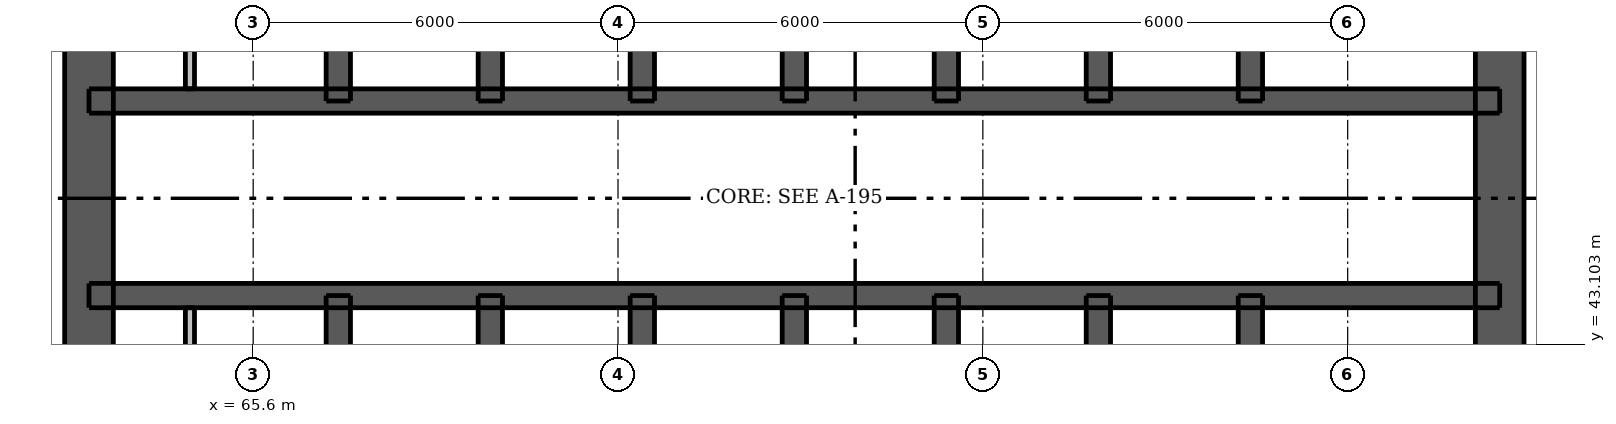
"""IFC4 building model, lengths in metres.
Left out: names, types, materials, properties, quantities, classifications, styles, units other than length and angle.
Written with IfcOpenShell. Run it as: python <this file> out.ifc"""

import sys

from ifc_helpers import new_model, si_unit, direction, frame, frame_2d, origin, place, context, subcontext, project, spatial, rectangle, extrude, element, fill, save


model = new_model("IFC4")
c1 = context("Model", 3, precision=1e-05, world=origin(), true_north=direction((0.0, 1.0)))
c2 = subcontext(c1, "Body", "Model", "MODEL_VIEW")
j1 = project(units=[si_unit("LENGTHUNIT", "METRE"), si_unit("PLANEANGLEUNIT", "RADIAN")], contexts=[c1])
p1 = place(None, origin())
s1 = spatial("IfcSite", under=j1, at=p1, CompositionType="ELEMENT")
p2 = place(p1, origin())
s2 = spatial("IfcBuilding", under=s1, at=p2, CompositionType="ELEMENT")
p3 = place(p2, frame((0.0, 0.0, 111.7)))
s3 = spatial("IfcBuildingStorey", under=s2, at=p3, CompositionType="ELEMENT", Elevation=111.7)
p4 = place(p3, frame((62.9, 33.5, 0.0), z_axis=(0.0, 0.0, 1.0), x_axis=(0.0, 1.0, 0.0)))
e1 = element("IfcWall", 1, at=p4, inside=s3, PredefinedType="SHEAR", context=c2, shape_type="SweptSolid", body=[
    extrude(rectangle(XDim=24.0, YDim=0.8, at=frame_2d((12.0, 0.0))), origin(), (0.0, 0.0, 1.0), 3.05),
])
p5 = place(p4, frame((11.2, 0.0, 0.0)))
e2 = element("IfcOpeningElement", 2, at=p5, cuts=e1, PredefinedType="OPENING", context=c2, shape_type="SweptSolid", body=[
    extrude(rectangle(XDim=1.6, YDim=2.1, at=frame_2d((0.8, 1.05))), frame((0.0, 0.41, 0.0), z_axis=(0.0, -1.0, 0.0), x_axis=(1.0, 0.0, 0.0)), (0.0, 0.0, 1.0), 0.82),
])
p6 = place(p3, frame((86.1, 33.5, 0.0), z_axis=(0.0, 0.0, 1.0), x_axis=(0.0, 1.0, 0.0)))
e3 = element("IfcWall", 3, at=p6, inside=s3, PredefinedType="SHEAR", context=c2, shape_type="SweptSolid", body=[
    extrude(rectangle(XDim=24.0, YDim=0.8, at=frame_2d((12.0, 0.0))), origin(), (0.0, 0.0, 1.0), 3.05),
])
p7 = place(p6, frame((11.2, 0.0, 0.0)))
e4 = element("IfcOpeningElement", 4, at=p7, cuts=e3, PredefinedType="OPENING", context=c2, shape_type="SweptSolid", body=[
    extrude(rectangle(XDim=1.6, YDim=2.1, at=frame_2d((0.8, 1.05))), frame((0.0, 0.41, 0.0), z_axis=(0.0, -1.0, 0.0), x_axis=(1.0, 0.0, 0.0)), (0.0, 0.0, 1.0), 0.82),
])
p8 = place(p3, frame((62.9, 43.9, 0.0), z_axis=(0.0, 0.0, 1.0), x_axis=(1.0, 0.0, 0.0)))
e5 = element("IfcWall", 5, at=p8, inside=s3, PredefinedType="SHEAR", context=c2, shape_type="SweptSolid", body=[
    extrude(rectangle(XDim=23.2, YDim=0.4, at=frame_2d((11.6, 0.0))), origin(), (0.0, 0.0, 1.0), 3.05),
])
p9 = place(p8, frame((0.63, 0.0, 0.0)))
e6 = element("IfcOpeningElement", 6, at=p9, cuts=e5, PredefinedType="OPENING", context=c2, shape_type="SweptSolid", body=[
    extrude(rectangle(XDim=0.8, YDim=2.1, at=frame_2d((0.4, 1.05))), frame((0.0, 0.21, 0.0), z_axis=(0.0, -1.0, 0.0), x_axis=(1.0, 0.0, 0.0)), (0.0, 0.0, 1.0), 0.42),
])
p10 = place(p8, frame((2.33, 0.0, 0.0)))
e7 = element("IfcOpeningElement", 7, at=p10, cuts=e5, PredefinedType="OPENING", context=c2, shape_type="SweptSolid", body=[
    extrude(rectangle(XDim=0.9, YDim=2.1, at=frame_2d((0.45, 1.05))), frame((0.0, 0.21, 0.0), z_axis=(0.0, -1.0, 0.0), x_axis=(1.0, 0.0, 0.0)), (0.0, 0.0, 1.0), 0.42),
])
p11 = place(p8, frame((20.6, 0.0, 0.0)))
e8 = element("IfcOpeningElement", 8, at=p11, cuts=e5, PredefinedType="OPENING", context=c2, shape_type="SweptSolid", body=[
    extrude(rectangle(XDim=0.9, YDim=2.1, at=frame_2d((0.45, 1.05))), frame((0.0, 0.21, 0.0), z_axis=(0.0, -1.0, 0.0), x_axis=(1.0, 0.0, 0.0)), (0.0, 0.0, 1.0), 0.42),
])
p12 = place(p8, frame((4.8, 0.0, 0.0)))
e9 = element("IfcOpeningElement", 9, at=p12, cuts=e5, PredefinedType="OPENING", context=c2, shape_type="SweptSolid", body=[
    extrude(rectangle(XDim=1.1, YDim=2.1, at=frame_2d((0.55, 1.05))), frame((0.0, 0.21, 0.0), z_axis=(0.0, -1.0, 0.0), x_axis=(1.0, 0.0, 0.0)), (0.0, 0.0, 1.0), 0.42),
])
p13 = place(p8, frame((7.3, 0.0, 0.0)))
e10 = element("IfcOpeningElement", 10, at=p13, cuts=e5, PredefinedType="OPENING", context=c2, shape_type="SweptSolid", body=[
    extrude(rectangle(XDim=1.1, YDim=2.1, at=frame_2d((0.55, 1.05))), frame((0.0, 0.21, 0.0), z_axis=(0.0, -1.0, 0.0), x_axis=(1.0, 0.0, 0.0)), (0.0, 0.0, 1.0), 0.42),
])
p14 = place(p8, frame((9.8, 0.0, 0.0)))
e11 = element("IfcOpeningElement", 11, at=p14, cuts=e5, PredefinedType="OPENING", context=c2, shape_type="SweptSolid", body=[
    extrude(rectangle(XDim=1.1, YDim=2.1, at=frame_2d((0.55, 1.05))), frame((0.0, 0.21, 0.0), z_axis=(0.0, -1.0, 0.0), x_axis=(1.0, 0.0, 0.0)), (0.0, 0.0, 1.0), 0.42),
])
p15 = place(p8, frame((12.3, 0.0, 0.0)))
e12 = element("IfcOpeningElement", 12, at=p15, cuts=e5, PredefinedType="OPENING", context=c2, shape_type="SweptSolid", body=[
    extrude(rectangle(XDim=1.1, YDim=2.1, at=frame_2d((0.55, 1.05))), frame((0.0, 0.21, 0.0), z_axis=(0.0, -1.0, 0.0), x_axis=(1.0, 0.0, 0.0)), (0.0, 0.0, 1.0), 0.42),
])
p16 = place(p8, frame((14.8, 0.0, 0.0)))
e13 = element("IfcOpeningElement", 13, at=p16, cuts=e5, PredefinedType="OPENING", context=c2, shape_type="SweptSolid", body=[
    extrude(rectangle(XDim=1.1, YDim=2.1, at=frame_2d((0.55, 1.05))), frame((0.0, 0.21, 0.0), z_axis=(0.0, -1.0, 0.0), x_axis=(1.0, 0.0, 0.0)), (0.0, 0.0, 1.0), 0.42),
])
p17 = place(p8, frame((17.3, 0.0, 0.0)))
e14 = element("IfcOpeningElement", 14, at=p17, cuts=e5, PredefinedType="OPENING", context=c2, shape_type="SweptSolid", body=[
    extrude(rectangle(XDim=1.1, YDim=2.1, at=frame_2d((0.55, 1.05))), frame((0.0, 0.21, 0.0), z_axis=(0.0, -1.0, 0.0), x_axis=(1.0, 0.0, 0.0)), (0.0, 0.0, 1.0), 0.42),
])
p18 = place(p3, frame((62.9, 47.1, 0.0), z_axis=(0.0, 0.0, 1.0), x_axis=(1.0, 0.0, 0.0)))
e15 = element("IfcWall", 15, at=p18, inside=s3, PredefinedType="SHEAR", context=c2, shape_type="SweptSolid", body=[
    extrude(rectangle(XDim=23.2, YDim=0.4, at=frame_2d((11.6, 0.0))), origin(), (0.0, 0.0, 1.0), 3.05),
])
p19 = place(p18, frame((0.63, 0.0, 0.0)))
e16 = element("IfcOpeningElement", 16, at=p19, cuts=e15, PredefinedType="OPENING", context=c2, shape_type="SweptSolid", body=[
    extrude(rectangle(XDim=0.8, YDim=2.1, at=frame_2d((0.4, 1.05))), frame((0.0, 0.21, 0.0), z_axis=(0.0, -1.0, 0.0), x_axis=(1.0, 0.0, 0.0)), (0.0, 0.0, 1.0), 0.42),
])
p20 = place(p18, frame((2.33, 0.0, 0.0)))
e17 = element("IfcOpeningElement", 17, at=p20, cuts=e15, PredefinedType="OPENING", context=c2, shape_type="SweptSolid", body=[
    extrude(rectangle(XDim=0.9, YDim=2.1, at=frame_2d((0.45, 1.05))), frame((0.0, 0.21, 0.0), z_axis=(0.0, -1.0, 0.0), x_axis=(1.0, 0.0, 0.0)), (0.0, 0.0, 1.0), 0.42),
])
p21 = place(p18, frame((20.6, 0.0, 0.0)))
e18 = element("IfcOpeningElement", 18, at=p21, cuts=e15, PredefinedType="OPENING", context=c2, shape_type="SweptSolid", body=[
    extrude(rectangle(XDim=0.9, YDim=2.1, at=frame_2d((0.45, 1.05))), frame((0.0, 0.21, 0.0), z_axis=(0.0, -1.0, 0.0), x_axis=(1.0, 0.0, 0.0)), (0.0, 0.0, 1.0), 0.42),
])
p22 = place(p3, frame((67.0, 33.9, 0.0), z_axis=(0.0, 0.0, 1.0), x_axis=(0.0, 1.0, 0.0)))
e19 = element("IfcWall", 19, at=p22, inside=s3, PredefinedType="SHEAR", context=c2, shape_type="SweptSolid", body=[
    extrude(rectangle(XDim=10.0, YDim=0.4, at=frame_2d((5.0, 0.0))), origin(), (0.0, 0.0, 1.0), 3.05),
])
p23 = place(p22, frame((0.6, 0.0, 0.0)))
e20 = element("IfcOpeningElement", 20, at=p23, cuts=e19, PredefinedType="OPENING", context=c2, shape_type="SweptSolid", body=[
    extrude(rectangle(XDim=1.1, YDim=2.1, at=frame_2d((0.55, 1.05))), frame((0.0, 0.21, 0.0), z_axis=(0.0, -1.0, 0.0), x_axis=(1.0, 0.0, 0.0)), (0.0, 0.0, 1.0), 0.42),
])
for number, where, z_axis, x_axis in (
    (21, (67.0, 47.1, 0.0), (0.0, 0.0, 1.0), (0.0, 1.0, 0.0)),
    (22, (82.0, 33.9, 0.0), (0.0, 0.0, 1.0), (0.0, 1.0, 0.0)),
    (23, (82.0, 47.1, 0.0), (0.0, 0.0, 1.0), (0.0, 1.0, 0.0)),
):
    element("IfcWall", number, at=place(p3, frame(where, z_axis=z_axis, x_axis=x_axis)), inside=s3, PredefinedType="SHEAR", context=c2, shape_type="SweptSolid", body=[
        extrude(rectangle(XDim=10.0, YDim=0.4, at=frame_2d((5.0, 0.0))), origin(), (0.0, 0.0, 1.0), 3.05),
    ])
for number, where, z_axis, x_axis in (
    (24, (69.5, 41.0, 0.0), (0.0, 0.0, 1.0), (0.0, 1.0, 0.0)),
    (25, (69.5, 47.1, 0.0), (0.0, 0.0, 1.0), (0.0, 1.0, 0.0)),
    (26, (72.0, 41.0, 0.0), (0.0, 0.0, 1.0), (0.0, 1.0, 0.0)),
    (27, (72.0, 47.1, 0.0), (0.0, 0.0, 1.0), (0.0, 1.0, 0.0)),
    (28, (74.5, 41.0, 0.0), (0.0, 0.0, 1.0), (0.0, 1.0, 0.0)),
    (29, (74.5, 47.1, 0.0), (0.0, 0.0, 1.0), (0.0, 1.0, 0.0)),
    (30, (77.0, 41.0, 0.0), (0.0, 0.0, 1.0), (0.0, 1.0, 0.0)),
    (31, (77.0, 47.1, 0.0), (0.0, 0.0, 1.0), (0.0, 1.0, 0.0)),
    (32, (79.5, 41.0, 0.0), (0.0, 0.0, 1.0), (0.0, 1.0, 0.0)),
    (33, (79.5, 47.1, 0.0), (0.0, 0.0, 1.0), (0.0, 1.0, 0.0)),
):
    element("IfcWall", number, at=place(p3, frame(where, z_axis=z_axis, x_axis=x_axis)), inside=s3, PredefinedType="SHEAR", context=c2, shape_type="SweptSolid", body=[
        extrude(rectangle(XDim=2.9, YDim=0.4, at=frame_2d((1.45, 0.0))), origin(), (0.0, 0.0, 1.0), 3.05),
    ])
for number, where, z_axis, x_axis in (
    (34, (64.56, 41.2, 0.0), (0.0, 0.0, 1.0), (0.0, 1.0, 0.0)),
    (35, (64.56, 47.3, 0.0), (0.0, 0.0, 1.0), (0.0, 1.0, 0.0)),
):
    element("IfcWall", number, at=place(p3, frame(where, z_axis=z_axis, x_axis=x_axis)), inside=s3, PredefinedType="PLUMBINGWALL", context=c2, shape_type="SweptSolid", body=[
        extrude(rectangle(XDim=2.5, YDim=0.15, at=frame_2d((1.25, 0.0))), origin(), (0.0, 0.0, 1.0), 3.05),
    ])
p24 = place(p5, origin())
e36 = element("IfcDoor", 36, at=p24, inside=s3, OperationType="DOUBLE_DOOR_SINGLE_SWING", PredefinedType="DOOR", context=c2, shape_type="SweptSolid", body=[
    extrude(rectangle(XDim=1.6, YDim=2.1, at=frame_2d((0.8, 1.05))), frame((0.0, -0.337, 0.0), z_axis=(0.0, -1.0, 0.0), x_axis=(1.0, 0.0, 0.0)), (0.0, 0.0, 1.0), 0.05),
])
fill(e2, e36)
p25 = place(p7, origin())
e37 = element("IfcDoor", 37, at=p25, inside=s3, OperationType="DOUBLE_DOOR_SINGLE_SWING", PredefinedType="DOOR", context=c2, shape_type="SweptSolid", body=[
    extrude(rectangle(XDim=1.6, YDim=2.1, at=frame_2d((0.8, 1.05))), frame((0.0, 0.388, 0.0), z_axis=(0.0, -1.0, 0.0), x_axis=(1.0, 0.0, 0.0)), (0.0, 0.0, 1.0), 0.05),
])
fill(e4, e37)
p26 = place(p9, origin())
e38 = element("IfcDoor", 38, at=p26, inside=s3, OperationType="SINGLE_SWING_LEFT", PredefinedType="DOOR", context=c2, shape_type="SweptSolid", body=[
    extrude(rectangle(XDim=0.8, YDim=2.1, at=frame_2d((0.4, 1.05))), frame((0.0, -0.138, 0.0), z_axis=(0.0, -1.0, 0.0), x_axis=(1.0, 0.0, 0.0)), (0.0, 0.0, 1.0), 0.05),
])
fill(e6, e38)
p27 = place(p10, origin())
e39 = element("IfcDoor", 39, at=p27, inside=s3, OperationType="SINGLE_SWING_RIGHT", PredefinedType="DOOR", context=c2, shape_type="SweptSolid", body=[
    extrude(rectangle(XDim=0.9, YDim=2.1, at=frame_2d((0.45, 1.05))), frame((0.0, -0.138, 0.0), z_axis=(0.0, -1.0, 0.0), x_axis=(1.0, 0.0, 0.0)), (0.0, 0.0, 1.0), 0.05),
])
fill(e7, e39)
p28 = place(p11, origin())
e40 = element("IfcDoor", 40, at=p28, inside=s3, OperationType="SINGLE_SWING_LEFT", PredefinedType="DOOR", context=c2, shape_type="SweptSolid", body=[
    extrude(rectangle(XDim=0.9, YDim=2.1, at=frame_2d((0.45, 1.05))), frame((0.0, -0.138, 0.0), z_axis=(0.0, -1.0, 0.0), x_axis=(1.0, 0.0, 0.0)), (0.0, 0.0, 1.0), 0.05),
])
fill(e8, e40)
p29 = place(p19, origin())
e41 = element("IfcDoor", 41, at=p29, inside=s3, OperationType="SINGLE_SWING_LEFT", PredefinedType="DOOR", context=c2, shape_type="SweptSolid", body=[
    extrude(rectangle(XDim=0.8, YDim=2.1, at=frame_2d((0.4, 1.05))), frame((0.0, 0.188, 0.0), z_axis=(0.0, -1.0, 0.0), x_axis=(1.0, 0.0, 0.0)), (0.0, 0.0, 1.0), 0.05),
])
fill(e16, e41)
p30 = place(p20, origin())
e42 = element("IfcDoor", 42, at=p30, inside=s3, OperationType="SINGLE_SWING_RIGHT", PredefinedType="DOOR", context=c2, shape_type="SweptSolid", body=[
    extrude(rectangle(XDim=0.9, YDim=2.1, at=frame_2d((0.45, 1.05))), frame((0.0, 0.188, 0.0), z_axis=(0.0, -1.0, 0.0), x_axis=(1.0, 0.0, 0.0)), (0.0, 0.0, 1.0), 0.05),
])
fill(e17, e42)
p31 = place(p21, origin())
e43 = element("IfcDoor", 43, at=p31, inside=s3, OperationType="SINGLE_SWING_LEFT", PredefinedType="DOOR", context=c2, shape_type="SweptSolid", body=[
    extrude(rectangle(XDim=0.9, YDim=2.1, at=frame_2d((0.45, 1.05))), frame((0.0, 0.188, 0.0), z_axis=(0.0, -1.0, 0.0), x_axis=(1.0, 0.0, 0.0)), (0.0, 0.0, 1.0), 0.05),
])
fill(e18, e43)
p32 = place(p12, origin())
e44 = element("IfcDoor", 44, at=p32, inside=s3, OperationType="DOUBLE_DOOR_SLIDING", PredefinedType="DOOR", context=c2, shape_type="SweptSolid", body=[
    extrude(rectangle(XDim=1.1, YDim=2.1, at=frame_2d((0.55, 1.05))), frame((0.0, 0.025, 0.0), z_axis=(0.0, -1.0, 0.0), x_axis=(1.0, 0.0, 0.0)), (0.0, 0.0, 1.0), 0.05),
])
fill(e9, e44)
p33 = place(p13, origin())
e45 = element("IfcDoor", 45, at=p33, inside=s3, OperationType="DOUBLE_DOOR_SLIDING", PredefinedType="DOOR", context=c2, shape_type="SweptSolid", body=[
    extrude(rectangle(XDim=1.1, YDim=2.1, at=frame_2d((0.55, 1.05))), frame((0.0, 0.025, 0.0), z_axis=(0.0, -1.0, 0.0), x_axis=(1.0, 0.0, 0.0)), (0.0, 0.0, 1.0), 0.05),
])
fill(e10, e45)
p34 = place(p14, origin())
e46 = element("IfcDoor", 46, at=p34, inside=s3, OperationType="DOUBLE_DOOR_SLIDING", PredefinedType="DOOR", context=c2, shape_type="SweptSolid", body=[
    extrude(rectangle(XDim=1.1, YDim=2.1, at=frame_2d((0.55, 1.05))), frame((0.0, 0.025, 0.0), z_axis=(0.0, -1.0, 0.0), x_axis=(1.0, 0.0, 0.0)), (0.0, 0.0, 1.0), 0.05),
])
fill(e11, e46)
p35 = place(p15, origin())
e47 = element("IfcDoor", 47, at=p35, inside=s3, OperationType="DOUBLE_DOOR_SLIDING", PredefinedType="DOOR", context=c2, shape_type="SweptSolid", body=[
    extrude(rectangle(XDim=1.1, YDim=2.1, at=frame_2d((0.55, 1.05))), frame((0.0, 0.025, 0.0), z_axis=(0.0, -1.0, 0.0), x_axis=(1.0, 0.0, 0.0)), (0.0, 0.0, 1.0), 0.05),
])
fill(e12, e47)
p36 = place(p16, origin())
e48 = element("IfcDoor", 48, at=p36, inside=s3, OperationType="DOUBLE_DOOR_SLIDING", PredefinedType="DOOR", context=c2, shape_type="SweptSolid", body=[
    extrude(rectangle(XDim=1.1, YDim=2.1, at=frame_2d((0.55, 1.05))), frame((0.0, 0.025, 0.0), z_axis=(0.0, -1.0, 0.0), x_axis=(1.0, 0.0, 0.0)), (0.0, 0.0, 1.0), 0.05),
])
fill(e13, e48)
p37 = place(p17, origin())
e49 = element("IfcDoor", 49, at=p37, inside=s3, OperationType="DOUBLE_DOOR_SLIDING", PredefinedType="DOOR", context=c2, shape_type="SweptSolid", body=[
    extrude(rectangle(XDim=1.1, YDim=2.1, at=frame_2d((0.55, 1.05))), frame((0.0, 0.025, 0.0), z_axis=(0.0, -1.0, 0.0), x_axis=(1.0, 0.0, 0.0)), (0.0, 0.0, 1.0), 0.05),
])
fill(e14, e49)
save(model, sys.argv[1])
